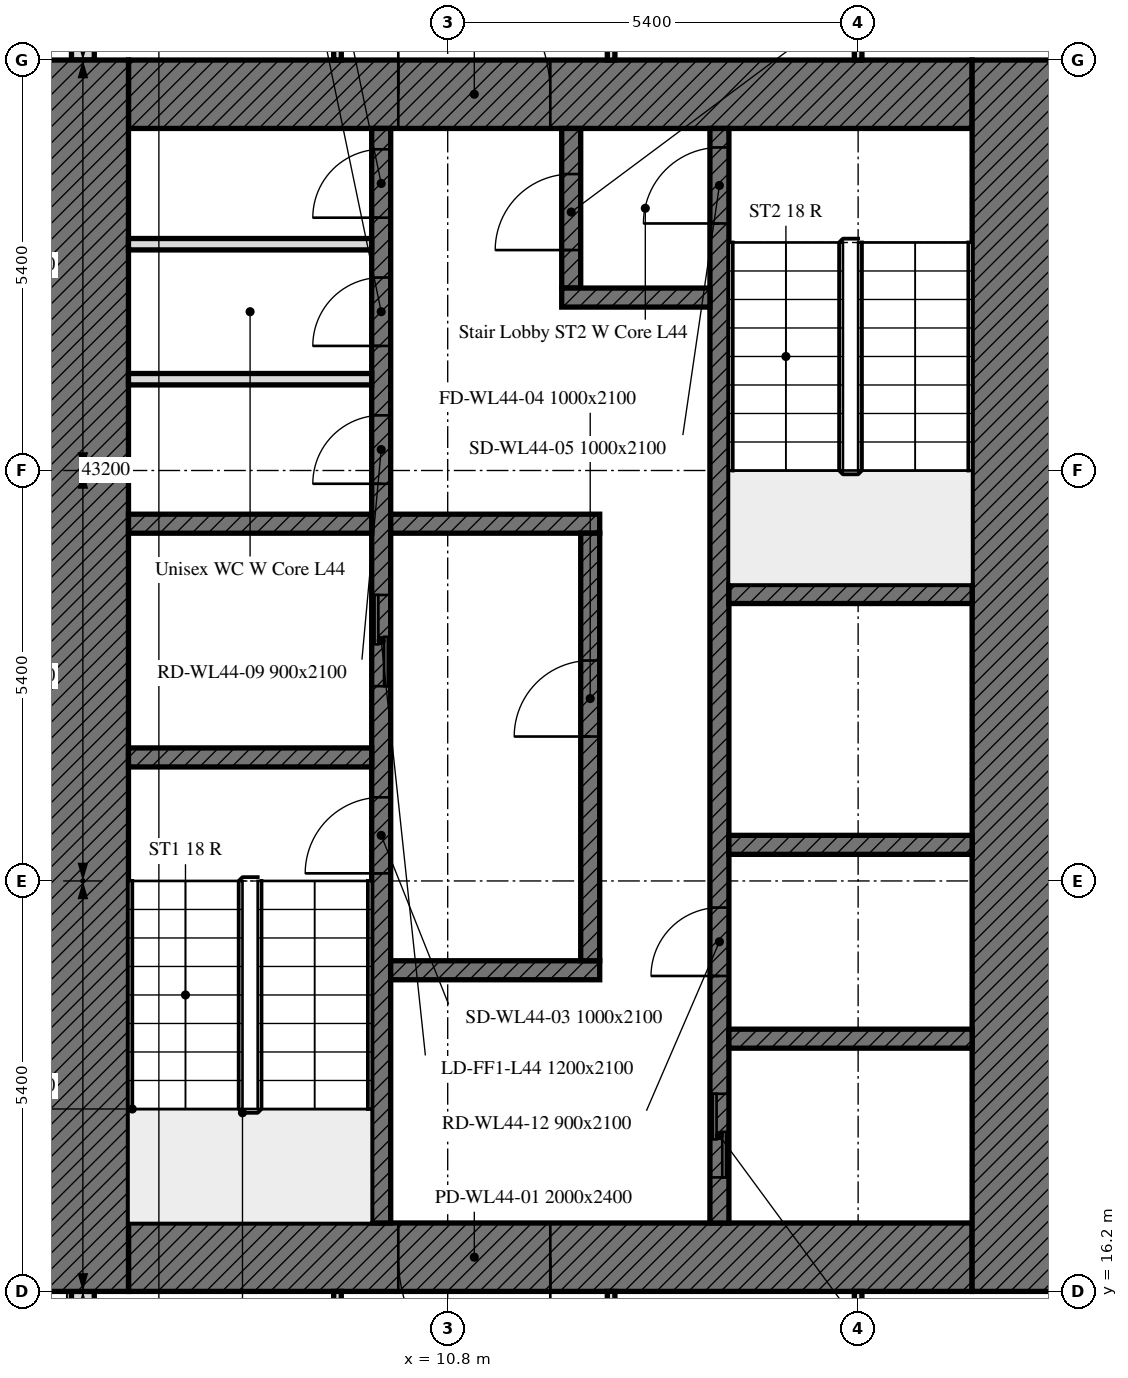
"""IFC4 building model, lengths in metres.
Left out: names, types, materials, properties, quantities, classifications, styles, units other than length and angle.
Written with IfcOpenShell. Run it as: python <this file> out.ifc"""

import sys

from ifc_helpers import new_model, si_unit, direction, frame, frame_2d, origin, place, context, subcontext, project, spatial, rectangle, extrude, element, fill, save


model = new_model("IFC4")
c1 = context("Model", 3, precision=1e-05, world=origin(), true_north=direction((0.0, 1.0)))
c2 = subcontext(c1, "Body", "Model", "MODEL_VIEW")
j1 = project(units=[si_unit("LENGTHUNIT", "METRE"), si_unit("PLANEANGLEUNIT", "RADIAN")], contexts=[c1])
p1 = place(None, origin())
s1 = spatial("IfcSite", under=j1, at=p1, CompositionType="ELEMENT")
p2 = place(p1, origin())
s2 = spatial("IfcBuilding", under=s1, at=p2, CompositionType="ELEMENT")
p3 = place(p2, frame((0.0, 0.0, 184.0)))
s3 = spatial("IfcBuildingStorey", under=s2, at=p3, CompositionType="ELEMENT", Elevation=184.0)
p4 = place(p3, frame((6.0, 43.014, 0.0), z_axis=(0.0, 0.0, 1.0), x_axis=(0.0, -1.0, 0.0)))
e1 = element("IfcWall", 1, at=p4, inside=s3, PredefinedType="SOLIDWALL", context=c2, shape_type="SweptSolid", body=[
    extrude(rectangle(XDim=10.614, YDim=0.3, at=frame_2d((5.307, 0.0))), origin(), (0.0, 0.0, 1.0), 3.0),
])
p5 = place(p4, frame((1.164, 0.0, 0.9)))
e2 = element("IfcOpeningElement", 2, at=p5, cuts=e1, PredefinedType="OPENING", context=c2, shape_type="SweptSolid", body=[
    extrude(rectangle(XDim=1.1, YDim=1.7, at=frame_2d((0.55, 0.85))), frame((0.0, 0.16, 0.0), z_axis=(0.0, -1.0, 0.0), x_axis=(1.0, 0.0, 0.0)), (0.0, 0.0, 1.0), 0.32),
])
p6 = place(p4, frame((2.764, 0.0, 0.9)))
e3 = element("IfcOpeningElement", 3, at=p6, cuts=e1, PredefinedType="OPENING", context=c2, shape_type="SweptSolid", body=[
    extrude(rectangle(XDim=1.1, YDim=1.7, at=frame_2d((0.55, 0.85))), frame((0.0, 0.16, 0.0), z_axis=(0.0, -1.0, 0.0), x_axis=(1.0, 0.0, 0.0)), (0.0, 0.0, 1.0), 0.32),
])
p7 = place(p4, frame((6.214, 0.0, 0.9)))
e4 = element("IfcOpeningElement", 4, at=p7, cuts=e1, PredefinedType="OPENING", context=c2, shape_type="SweptSolid", body=[
    extrude(rectangle(XDim=3.4, YDim=1.7, at=frame_2d((1.7, 0.85))), frame((0.0, 0.16, 0.0), z_axis=(0.0, -1.0, 0.0), x_axis=(1.0, 0.0, 0.0)), (0.0, 0.0, 1.0), 0.32),
])
p8 = place(p3, frame((6.0, 16.2, 0.0), z_axis=(0.0, 0.0, 1.0), x_axis=(0.0, -1.0, 0.0)))
e5 = element("IfcWall", 5, at=p8, inside=s3, PredefinedType="SOLIDWALL", context=c2, shape_type="SweptSolid", body=[
    extrude(rectangle(XDim=5.214, YDim=0.3, at=frame_2d((2.607, 0.0))), origin(), (0.0, 0.0, 1.0), 3.0),
])
p9 = place(p8, frame((1.35, 0.0, 0.9)))
e6 = element("IfcOpeningElement", 6, at=p9, cuts=e5, PredefinedType="OPENING", context=c2, shape_type="SweptSolid", body=[
    extrude(rectangle(XDim=1.1, YDim=1.7, at=frame_2d((0.55, 0.85))), frame((0.0, 0.16, 0.0), z_axis=(0.0, -1.0, 0.0), x_axis=(1.0, 0.0, 0.0)), (0.0, 0.0, 1.0), 0.32),
])
p10 = place(p8, frame((2.95, 0.0, 0.9)))
e7 = element("IfcOpeningElement", 7, at=p10, cuts=e5, PredefinedType="OPENING", context=c2, shape_type="SweptSolid", body=[
    extrude(rectangle(XDim=1.1, YDim=1.7, at=frame_2d((0.55, 0.85))), frame((0.0, 0.16, 0.0), z_axis=(0.0, -1.0, 0.0), x_axis=(1.0, 0.0, 0.0)), (0.0, 0.0, 1.0), 0.32),
])
p11 = place(p3, frame((17.7, 16.65, 0.0), z_axis=(0.0, 0.0, 1.0), x_axis=(-1.0, 0.0, 0.0)))
e8 = element("IfcWall", 8, at=p11, inside=s3, PredefinedType="SOLIDWALL", context=c2, shape_type="SweptSolid", body=[
    extrude(rectangle(XDim=11.1, YDim=0.9, at=frame_2d((5.55, 0.0))), origin(), (0.0, 0.0, 1.0), 3.0),
])
p12 = place(p11, frame((5.55, 0.0, 0.0)))
e9 = element("IfcOpeningElement", 9, at=p12, cuts=e8, PredefinedType="OPENING", context=c2, shape_type="SweptSolid", body=[
    extrude(rectangle(XDim=2.0, YDim=2.4, at=frame_2d((1.0, 1.2))), frame((0.0, 0.45, 0.0), z_axis=(0.0, -1.0, 0.0), x_axis=(1.0, 0.0, 0.0)), (0.0, 0.0, 1.0), 0.9),
])
p13 = place(p3, frame((6.6, 31.95, 0.0), z_axis=(0.0, 0.0, 1.0), x_axis=(1.0, 0.0, 0.0)))
e10 = element("IfcWall", 10, at=p13, inside=s3, PredefinedType="SOLIDWALL", context=c2, shape_type="SweptSolid", body=[
    extrude(rectangle(XDim=11.1, YDim=0.9, at=frame_2d((5.55, 0.0))), origin(), (0.0, 0.0, 1.0), 3.0),
])
p14 = place(p13, frame((3.55, 0.0, 0.0)))
e11 = element("IfcOpeningElement", 11, at=p14, cuts=e10, PredefinedType="OPENING", context=c2, shape_type="SweptSolid", body=[
    extrude(rectangle(XDim=2.0, YDim=2.4, at=frame_2d((1.0, 1.2))), frame((0.0, 0.45, 0.0), z_axis=(0.0, -1.0, 0.0), x_axis=(1.0, 0.0, 0.0)), (0.0, 0.0, 1.0), 0.9),
])
for number, where, z_axis, x_axis in (
    (12, (6.0, 16.2, 0.0), (0.0, 0.0, 1.0), (0.0, 1.0, 0.0)),
    (13, (18.3, 32.4, 0.0), (0.0, 0.0, 1.0), (0.0, -1.0, 0.0)),
):
    element("IfcWall", number, at=place(p3, frame(where, z_axis=z_axis, x_axis=x_axis)), inside=s3, PredefinedType="SOLIDWALL", context=c2, shape_type="SweptSolid", body=[
        extrude(rectangle(XDim=16.2, YDim=1.2, at=frame_2d((8.1, 0.0))), origin(), (0.0, 0.0, 1.0), 3.0),
    ])
p15 = place(p3, frame((9.925, 17.1, 0.0), z_axis=(0.0, 0.0, 1.0), x_axis=(0.0, 1.0, 0.0)))
e14 = element("IfcWall", 14, at=p15, inside=s3, PredefinedType="SOLIDWALL", context=c2, shape_type="SweptSolid", body=[
    extrude(rectangle(XDim=14.4, YDim=0.25, at=frame_2d((7.2, 0.0))), origin(), (0.0, 0.0, 1.0), 3.0),
])
p16 = place(p15, frame((4.6, 0.0, 0.0)))
e15 = element("IfcOpeningElement", 15, at=p16, cuts=e14, PredefinedType="OPENING", context=c2, shape_type="SweptSolid", body=[
    extrude(rectangle(XDim=1.0, YDim=2.1, at=frame_2d((0.5, 1.05))), frame((0.0, 0.125, 0.0), z_axis=(0.0, -1.0, 0.0), x_axis=(1.0, 0.0, 0.0)), (0.0, 0.0, 1.0), 0.25),
])
p17 = place(p15, frame((7.062, 0.0, 0.0)))
e16 = element("IfcOpeningElement", 16, at=p17, cuts=e14, PredefinedType="OPENING", context=c2, shape_type="SweptSolid", body=[
    extrude(rectangle(XDim=1.2, YDim=2.1, at=frame_2d((0.6, 1.05))), frame((0.0, 0.125, 0.0), z_axis=(0.0, -1.0, 0.0), x_axis=(1.0, 0.0, 0.0)), (0.0, 0.0, 1.0), 0.25),
])
p18 = place(p15, frame((9.726, 0.0, 0.0)))
e17 = element("IfcOpeningElement", 17, at=p18, cuts=e14, PredefinedType="OPENING", context=c2, shape_type="SweptSolid", body=[
    extrude(rectangle(XDim=0.9, YDim=2.1, at=frame_2d((0.45, 1.05))), frame((0.0, 0.125, 0.0), z_axis=(0.0, -1.0, 0.0), x_axis=(1.0, 0.0, 0.0)), (0.0, 0.0, 1.0), 0.25),
])
p19 = place(p15, frame((11.539, 0.0, 0.0)))
e18 = element("IfcOpeningElement", 18, at=p19, cuts=e14, PredefinedType="OPENING", context=c2, shape_type="SweptSolid", body=[
    extrude(rectangle(XDim=0.9, YDim=2.1, at=frame_2d((0.45, 1.05))), frame((0.0, 0.125, 0.0), z_axis=(0.0, -1.0, 0.0), x_axis=(1.0, 0.0, 0.0)), (0.0, 0.0, 1.0), 0.25),
])
p20 = place(p15, frame((13.226, 0.0, 0.0)))
e19 = element("IfcOpeningElement", 19, at=p20, cuts=e14, PredefinedType="OPENING", context=c2, shape_type="SweptSolid", body=[
    extrude(rectangle(XDim=0.9, YDim=2.1, at=frame_2d((0.45, 1.05))), frame((0.0, 0.125, 0.0), z_axis=(0.0, -1.0, 0.0), x_axis=(1.0, 0.0, 0.0)), (0.0, 0.0, 1.0), 0.25),
])
p21 = place(p3, frame((14.375, 17.1, 0.0), z_axis=(0.0, 0.0, 1.0), x_axis=(0.0, 1.0, 0.0)))
e20 = element("IfcWall", 20, at=p21, inside=s3, PredefinedType="SOLIDWALL", context=c2, shape_type="SweptSolid", body=[
    extrude(rectangle(XDim=14.4, YDim=0.25, at=frame_2d((7.2, 0.0))), origin(), (0.0, 0.0, 1.0), 3.0),
])
p22 = place(p21, frame((13.15, 0.0, 0.0)))
e21 = element("IfcOpeningElement", 21, at=p22, cuts=e20, PredefinedType="OPENING", context=c2, shape_type="SweptSolid", body=[
    extrude(rectangle(XDim=1.0, YDim=2.1, at=frame_2d((0.5, 1.05))), frame((0.0, 0.125, 0.0), z_axis=(0.0, -1.0, 0.0), x_axis=(1.0, 0.0, 0.0)), (0.0, 0.0, 1.0), 0.25),
])
p23 = place(p21, frame((0.6, 0.0, 0.0)))
e22 = element("IfcOpeningElement", 22, at=p23, cuts=e20, PredefinedType="OPENING", context=c2, shape_type="SweptSolid", body=[
    extrude(rectangle(XDim=1.1, YDim=2.1, at=frame_2d((0.55, 1.05))), frame((0.0, 0.125, 0.0), z_axis=(0.0, -1.0, 0.0), x_axis=(1.0, 0.0, 0.0)), (0.0, 0.0, 1.0), 0.25),
])
p24 = place(p21, frame((3.25, 0.0, 0.0)))
e23 = element("IfcOpeningElement", 23, at=p24, cuts=e20, PredefinedType="OPENING", context=c2, shape_type="SweptSolid", body=[
    extrude(rectangle(XDim=0.9, YDim=2.1, at=frame_2d((0.45, 1.05))), frame((0.0, 0.125, 0.0), z_axis=(0.0, -1.0, 0.0), x_axis=(1.0, 0.0, 0.0)), (0.0, 0.0, 1.0), 0.25),
])
for number, where, z_axis, x_axis in (
    (24, (6.6, 23.225, 0.0), (0.0, 0.0, 1.0), (1.0, 0.0, 0.0)),
    (25, (14.5, 25.375, 0.0), (0.0, 0.0, 1.0), (1.0, 0.0, 0.0)),
    (26, (14.5, 22.075, 0.0), (0.0, 0.0, 1.0), (1.0, 0.0, 0.0)),
    (27, (6.6, 26.3, 0.0), (0.0, 0.0, 1.0), (1.0, 0.0, 0.0)),
):
    element("IfcWall", number, at=place(p3, frame(where, z_axis=z_axis, x_axis=x_axis)), inside=s3, PredefinedType="SOLIDWALL", context=c2, shape_type="SweptSolid", body=[
        extrude(rectangle(XDim=3.2, YDim=0.25, at=frame_2d((1.6, 0.0))), origin(), (0.0, 0.0, 1.0), 3.0),
    ])
for number, where, z_axis, x_axis in (
    (28, (10.05, 26.3, 0.0), (0.0, 0.0, 1.0), (1.0, 0.0, 0.0)),
    (29, (10.05, 20.425, 0.0), (0.0, 0.0, 1.0), (1.0, 0.0, 0.0)),
):
    element("IfcWall", number, at=place(p3, frame(where, z_axis=z_axis, x_axis=x_axis)), inside=s3, PredefinedType="SOLIDWALL", context=c2, shape_type="SweptSolid", body=[
        extrude(rectangle(XDim=2.75, YDim=0.25, at=frame_2d((1.375, 0.0))), origin(), (0.0, 0.0, 1.0), 3.0),
    ])
p25 = place(p3, frame((12.425, 29.4, 0.0), z_axis=(0.0, 0.0, 1.0), x_axis=(0.0, 1.0, 0.0)))
e30 = element("IfcWall", 30, at=p25, inside=s3, PredefinedType="SOLIDWALL", context=c2, shape_type="SweptSolid", body=[
    extrude(rectangle(XDim=2.1, YDim=0.25, at=frame_2d((1.05, 0.0))), origin(), (0.0, 0.0, 1.0), 3.0),
])
p26 = place(p25, frame((0.5, 0.0, 0.0)))
e31 = element("IfcOpeningElement", 31, at=p26, cuts=e30, PredefinedType="OPENING", context=c2, shape_type="SweptSolid", body=[
    extrude(rectangle(XDim=1.0, YDim=2.1, at=frame_2d((0.5, 1.05))), frame((0.0, 0.125, 0.0), z_axis=(0.0, -1.0, 0.0), x_axis=(1.0, 0.0, 0.0)), (0.0, 0.0, 1.0), 0.25),
])
p27 = place(p3, frame((12.3, 29.275, 0.0), z_axis=(0.0, 0.0, 1.0), x_axis=(1.0, 0.0, 0.0)))
e32 = element("IfcWall", 32, at=p27, inside=s3, PredefinedType="SOLIDWALL", context=c2, shape_type="SweptSolid", body=[
    extrude(rectangle(XDim=1.95, YDim=0.25, at=frame_2d((0.975, 0.0))), origin(), (0.0, 0.0, 1.0), 3.0),
])
p28 = place(p3, frame((12.675, 20.55, 0.0), z_axis=(0.0, 0.0, 1.0), x_axis=(0.0, 1.0, 0.0)))
e33 = element("IfcWall", 33, at=p28, inside=s3, PredefinedType="SOLIDWALL", context=c2, shape_type="SweptSolid", body=[
    extrude(rectangle(XDim=5.625, YDim=0.25, at=frame_2d((2.812, 0.0))), origin(), (0.0, 0.0, 1.0), 3.0),
])
p29 = place(p28, frame((2.95, 0.0, 0.0)))
e34 = element("IfcOpeningElement", 34, at=p29, cuts=e33, PredefinedType="OPENING", context=c2, shape_type="SweptSolid", body=[
    extrude(rectangle(XDim=1.0, YDim=2.1, at=frame_2d((0.5, 1.05))), frame((0.0, 0.125, 0.0), z_axis=(0.0, -1.0, 0.0), x_axis=(1.0, 0.0, 0.0)), (0.0, 0.0, 1.0), 0.25),
])
p30 = place(p3, frame((14.5, 19.525, 0.0), z_axis=(0.0, 0.0, 1.0), x_axis=(1.0, 0.0, 0.0)))
e35 = element("IfcWall", 35, at=p30, inside=s3, PredefinedType="SOLIDWALL", context=c2, shape_type="SweptSolid", body=[
    extrude(rectangle(XDim=3.2, YDim=0.25, at=frame_2d((1.6, 0.0))), origin(), (0.0, 0.0, 1.0), 3.0),
])
for number, where, z_axis, x_axis in (
    (36, (6.6, 28.201, 0.0), (0.0, 0.0, 1.0), (1.0, 0.0, 0.0)),
    (37, (6.6, 29.977, 0.0), (0.0, 0.0, 1.0), (1.0, 0.0, 0.0)),
):
    element("IfcWall", number, at=place(p3, frame(where, z_axis=z_axis, x_axis=x_axis)), inside=s3, PredefinedType="PARTITIONING", context=c2, shape_type="SweptSolid", body=[
        extrude(rectangle(XDim=3.2, YDim=0.15, at=frame_2d((1.6, 0.0))), origin(), (0.0, 0.0, 1.0), 3.0),
    ])
p31 = place(p3, frame((16.2, 37.38, 0.0), z_axis=(0.0, 0.0, 1.0), x_axis=(0.0, -1.0, 0.0)))
e38 = element("IfcWall", 38, at=p31, inside=s3, PredefinedType="PARTITIONING", context=c2, shape_type="SweptSolid", body=[
    extrude(rectangle(XDim=4.98, YDim=0.1, at=frame_2d((2.49, 0.0))), origin(), (0.0, 0.0, 1.0), 2.4),
])
for number, where, z_axis, x_axis in (
    (39, (9.35, 38.625, 0.0), (0.0, 0.0, 1.0), (0.0, -1.0, 0.0)),
    (40, (12.95, 32.4, 0.0), (0.0, 0.0, 1.0), (0.0, 1.0, 0.0)),
):
    element("IfcWall", number, at=place(p3, frame(where, z_axis=z_axis, x_axis=x_axis)), inside=s3, PredefinedType="PARTITIONING", context=c2, shape_type="SweptSolid", body=[
        extrude(rectangle(XDim=6.225, YDim=0.1, at=frame_2d((3.113, 0.0))), origin(), (0.0, 0.0, 1.0), 3.0),
    ])
for number, where, z_axis, x_axis in (
    (41, (16.2, 16.2, 0.0), (0.0, 0.0, 1.0), (0.0, -1.0, 0.0)),
    (42, (9.35, 16.2, 0.0), (0.0, 0.0, 1.0), (0.0, -1.0, 0.0)),
    (43, (12.95, 13.575, 0.0), (0.0, 0.0, 1.0), (0.0, 1.0, 0.0)),
):
    element("IfcWall", number, at=place(p3, frame(where, z_axis=z_axis, x_axis=x_axis)), inside=s3, PredefinedType="PARTITIONING", context=c2, shape_type="SweptSolid", body=[
        extrude(rectangle(XDim=2.625, YDim=0.1, at=frame_2d((1.312, 0.0))), origin(), (0.0, 0.0, 1.0), 3.0),
    ])
p32 = place(p12, origin())
e44 = element("IfcDoor", 44, at=p32, inside=s3, OperationType="DOUBLE_DOOR_SINGLE_SWING", PredefinedType="DOOR", context=c2, shape_type="SweptSolid", body=[
    extrude(rectangle(XDim=2.0, YDim=2.4, at=frame_2d((1.0, 1.2))), frame((0.0, 0.025, 0.0), z_axis=(0.0, -1.0, 0.0), x_axis=(1.0, 0.0, 0.0)), (0.0, 0.0, 1.0), 0.05),
])
fill(e9, e44)
p33 = place(p14, origin())
e45 = element("IfcDoor", 45, at=p33, inside=s3, OperationType="DOUBLE_DOOR_SINGLE_SWING", PredefinedType="DOOR", context=c2, shape_type="SweptSolid", body=[
    extrude(rectangle(XDim=2.0, YDim=2.4, at=frame_2d((1.0, 1.2))), frame((0.0, 0.025, 0.0), z_axis=(0.0, -1.0, 0.0), x_axis=(1.0, 0.0, 0.0)), (0.0, 0.0, 1.0), 0.05),
])
fill(e11, e45)
p34 = place(p16, origin())
e46 = element("IfcDoor", 46, at=p34, inside=s3, OperationType="SINGLE_SWING_LEFT", PredefinedType="DOOR", context=c2, shape_type="SweptSolid", body=[
    extrude(rectangle(XDim=1.0, YDim=2.1, at=frame_2d((0.5, 1.05))), frame((0.0, 0.025, 0.0), z_axis=(0.0, -1.0, 0.0), x_axis=(1.0, 0.0, 0.0)), (0.0, 0.0, 1.0), 0.05),
])
fill(e15, e46)
p35 = place(p29, origin())
e47 = element("IfcDoor", 47, at=p35, inside=s3, OperationType="SINGLE_SWING_LEFT", PredefinedType="DOOR", context=c2, shape_type="SweptSolid", body=[
    extrude(rectangle(XDim=1.0, YDim=2.1, at=frame_2d((0.5, 1.05))), frame((0.0, 0.025, 0.0), z_axis=(0.0, -1.0, 0.0), x_axis=(1.0, 0.0, 0.0)), (0.0, 0.0, 1.0), 0.05),
])
fill(e34, e47)
p36 = place(p22, origin())
e48 = element("IfcDoor", 48, at=p36, inside=s3, OperationType="SINGLE_SWING_LEFT", PredefinedType="DOOR", context=c2, shape_type="SweptSolid", body=[
    extrude(rectangle(XDim=1.0, YDim=2.1, at=frame_2d((0.5, 1.05))), frame((0.0, 0.025, 0.0), z_axis=(0.0, -1.0, 0.0), x_axis=(1.0, 0.0, 0.0)), (0.0, 0.0, 1.0), 0.05),
])
fill(e21, e48)
p37 = place(p26, origin())
e49 = element("IfcDoor", 49, at=p37, inside=s3, OperationType="SINGLE_SWING_LEFT", PredefinedType="DOOR", context=c2, shape_type="SweptSolid", body=[
    extrude(rectangle(XDim=1.0, YDim=2.1, at=frame_2d((0.5, 1.05))), frame((0.0, 0.025, 0.0), z_axis=(0.0, -1.0, 0.0), x_axis=(1.0, 0.0, 0.0)), (0.0, 0.0, 1.0), 0.05),
])
fill(e31, e49)
p38 = place(p17, origin())
e50 = element("IfcDoor", 50, at=p38, inside=s3, OperationType="DOUBLE_DOOR_SLIDING", PredefinedType="DOOR", context=c2, shape_type="SweptSolid", body=[
    extrude(rectangle(XDim=1.2, YDim=2.1, at=frame_2d((0.6, 1.05))), frame((0.0, 0.025, 0.0), z_axis=(0.0, -1.0, 0.0), x_axis=(1.0, 0.0, 0.0)), (0.0, 0.0, 1.0), 0.05),
])
fill(e16, e50)
p39 = place(p23, origin())
e51 = element("IfcDoor", 51, at=p39, inside=s3, OperationType="DOUBLE_DOOR_SLIDING", PredefinedType="DOOR", context=c2, shape_type="SweptSolid", body=[
    extrude(rectangle(XDim=1.1, YDim=2.1, at=frame_2d((0.55, 1.05))), frame((0.0, 0.025, 0.0), z_axis=(0.0, -1.0, 0.0), x_axis=(1.0, 0.0, 0.0)), (0.0, 0.0, 1.0), 0.05),
])
fill(e22, e51)
p40 = place(p18, origin())
e52 = element("IfcDoor", 52, at=p40, inside=s3, OperationType="SINGLE_SWING_LEFT", PredefinedType="DOOR", context=c2, shape_type="SweptSolid", body=[
    extrude(rectangle(XDim=0.9, YDim=2.1, at=frame_2d((0.45, 1.05))), frame((0.0, 0.025, 0.0), z_axis=(0.0, -1.0, 0.0), x_axis=(1.0, 0.0, 0.0)), (0.0, 0.0, 1.0), 0.05),
])
fill(e17, e52)
p41 = place(p19, origin())
e53 = element("IfcDoor", 53, at=p41, inside=s3, OperationType="SINGLE_SWING_LEFT", PredefinedType="DOOR", context=c2, shape_type="SweptSolid", body=[
    extrude(rectangle(XDim=0.9, YDim=2.1, at=frame_2d((0.45, 1.05))), frame((0.0, 0.025, 0.0), z_axis=(0.0, -1.0, 0.0), x_axis=(1.0, 0.0, 0.0)), (0.0, 0.0, 1.0), 0.05),
])
fill(e18, e53)
p42 = place(p20, origin())
e54 = element("IfcDoor", 54, at=p42, inside=s3, OperationType="SINGLE_SWING_LEFT", PredefinedType="DOOR", context=c2, shape_type="SweptSolid", body=[
    extrude(rectangle(XDim=0.9, YDim=2.1, at=frame_2d((0.45, 1.05))), frame((0.0, 0.025, 0.0), z_axis=(0.0, -1.0, 0.0), x_axis=(1.0, 0.0, 0.0)), (0.0, 0.0, 1.0), 0.05),
])
fill(e19, e54)
p43 = place(p24, origin())
e55 = element("IfcDoor", 55, at=p43, inside=s3, OperationType="SINGLE_SWING_LEFT", PredefinedType="DOOR", context=c2, shape_type="SweptSolid", body=[
    extrude(rectangle(XDim=0.9, YDim=2.1, at=frame_2d((0.45, 1.05))), frame((0.0, 0.025, 0.0), z_axis=(0.0, -1.0, 0.0), x_axis=(1.0, 0.0, 0.0)), (0.0, 0.0, 1.0), 0.05),
])
fill(e23, e55)
save(model, sys.argv[1])
